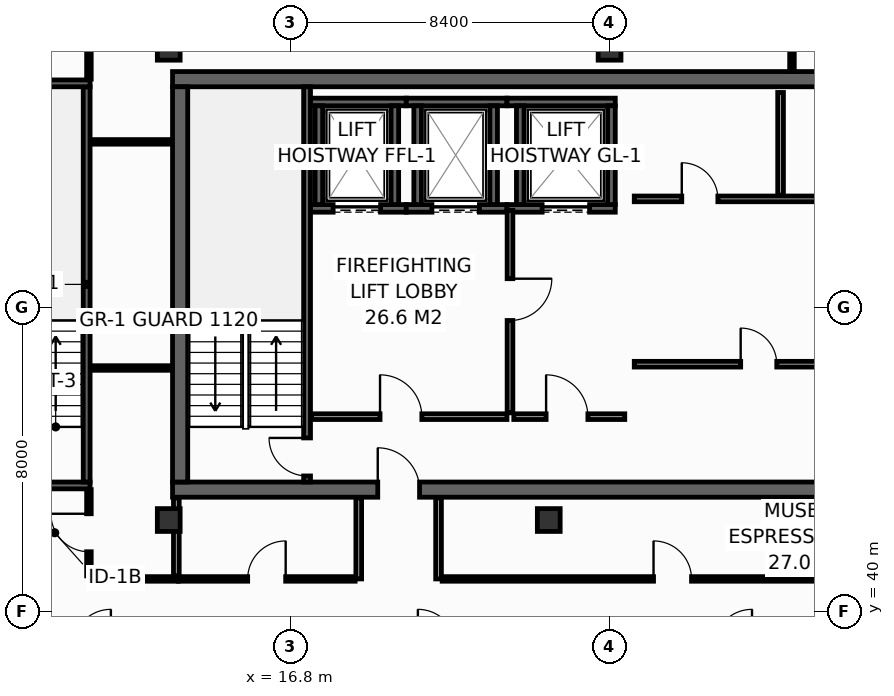
"""IFC4 building model, lengths in metres.
Left out: names, types, materials, properties, quantities, classifications, styles, units other than length and angle.
Written with IfcOpenShell. Run it as: python <this file> out.ifc"""

import sys

from ifc_helpers import new_model, si_unit, direction, frame, frame_2d, origin, origin_2d, place, context, subcontext, project, spatial, rectangle, hollow_rectangle, extrude, element, fill, save


model = new_model("IFC4")
c1 = context("Model", 3, precision=1e-05, world=origin(), true_north=direction((0.0, 1.0)))
c2 = subcontext(c1, "Body", "Model", "MODEL_VIEW")
j1 = project(units=[si_unit("LENGTHUNIT", "METRE"), si_unit("PLANEANGLEUNIT", "RADIAN")], contexts=[c1])
p1 = place(None, origin())
s1 = spatial("IfcSite", under=j1, at=p1, CompositionType="ELEMENT")
p2 = place(p1, origin())
s2 = spatial("IfcBuilding", under=s1, at=p2, CompositionType="ELEMENT")
p3 = place(p2, frame((0.0, 0.0, 261.0)))
s3 = spatial("IfcBuildingStorey", under=s2, at=p3, CompositionType="ELEMENT", Elevation=261.0)
p4 = place(p3, frame((13.7, 43.2, 0.0), z_axis=(0.0, 0.0, 1.0), x_axis=(1.0, 0.0, 0.0)))
e1 = element("IfcWall", 1, at=p4, inside=s3, PredefinedType="SHEAR", context=c2, shape_type="SweptSolid", body=[
    extrude(rectangle(XDim=32.5, YDim=0.4, at=frame_2d((16.25, 0.0))), origin(), (0.0, 0.0, 1.0), 3.55),
])
p5 = place(p4, frame((5.4, 0.0, 0.0)))
e2 = element("IfcOpeningElement", 2, at=p5, cuts=e1, PredefinedType="OPENING", context=c2, shape_type="SweptSolid", body=[
    extrude(rectangle(XDim=1.1, YDim=2.15, at=frame_2d((0.55, 1.075))), frame((0.0, 0.21, 0.0), z_axis=(0.0, -1.0, 0.0), x_axis=(1.0, 0.0, 0.0)), (0.0, 0.0, 1.0), 0.42),
])
p6 = place(p4, frame((25.6, 0.0, 0.0)))
e3 = element("IfcOpeningElement", 3, at=p6, cuts=e1, PredefinedType="OPENING", context=c2, shape_type="SweptSolid", body=[
    extrude(rectangle(XDim=1.1, YDim=2.15, at=frame_2d((0.55, 1.075))), frame((0.0, 0.21, 0.0), z_axis=(0.0, -1.0, 0.0), x_axis=(1.0, 0.0, 0.0)), (0.0, 0.0, 1.0), 0.42),
])
p7 = place(p3, frame((13.7, 54.0, 0.0), z_axis=(0.0, 0.0, 1.0), x_axis=(1.0, 0.0, 0.0)))
e4 = element("IfcWall", 4, at=p7, inside=s3, PredefinedType="SHEAR", context=c2, shape_type="SweptSolid", body=[
    extrude(rectangle(XDim=32.5, YDim=0.4, at=frame_2d((16.25, 0.0))), origin(), (0.0, 0.0, 1.0), 3.55),
])
p8 = place(p3, frame((13.9, 43.4, 0.0), z_axis=(0.0, 0.0, 1.0), x_axis=(0.0, 1.0, 0.0)))
e5 = element("IfcWall", 5, at=p8, inside=s3, PredefinedType="SHEAR", context=c2, shape_type="SweptSolid", body=[
    extrude(rectangle(XDim=10.4, YDim=0.4, at=frame_2d((5.2, 0.0))), origin(), (0.0, 0.0, 1.0), 3.55),
])
for number, where, z_axis, x_axis in (
    (6, (13.6, 54.8, 0.0), (0.0, 0.0, 1.0), (1.0, 0.0, 0.0)),
    (7, (25.2, 54.8, 0.0), (0.0, 0.0, 1.0), (1.0, 0.0, 0.0)),
    (8, (13.6, 42.4, 0.0), (0.0, 0.0, 1.0), (1.0, 0.0, 0.0)),
    (9, (23.6, 42.4, 0.0), (0.0, 0.0, 1.0), (1.0, 0.0, 0.0)),
):
    element("IfcColumn", number, at=place(p3, frame(where, z_axis=z_axis, x_axis=x_axis)), inside=s3, PredefinedType="COLUMN", context=c2, shape_type="SweptSolid", body=[
        extrude(hollow_rectangle(XDim=0.6, YDim=0.6, WallThickness=0.028, at=origin_2d()), origin(), (0.0, 0.0, 1.0), 3.8),
    ])
p9 = place(p3, frame((17.33, 50.6, 0.0), z_axis=(0.0, 0.0, 1.0), x_axis=(1.0, 0.0, 0.0)))
e10 = element("IfcWall", 10, at=p9, inside=s3, PredefinedType="SHEAR", context=c2, shape_type="SweptSolid", body=[
    extrude(rectangle(XDim=2.52, YDim=0.2, at=frame_2d((1.26, 0.0))), origin(), (0.0, 0.0, 1.0), 3.55),
])
p10 = place(p9, frame((0.595, 0.0, 0.0)))
e11 = element("IfcOpeningElement", 11, at=p10, cuts=e10, PredefinedType="OPENING", context=c2, shape_type="SweptSolid", body=[
    extrude(rectangle(XDim=1.25, YDim=2.3, at=frame_2d((0.625, 1.15))), frame((0.0, 0.11, 0.0), z_axis=(0.0, -1.0, 0.0), x_axis=(1.0, 0.0, 0.0)), (0.0, 0.0, 1.0), 0.22),
])
p11 = place(p3, frame((17.33, 53.4, 0.0), z_axis=(0.0, 0.0, 1.0), x_axis=(1.0, 0.0, 0.0)))
e12 = element("IfcWall", 12, at=p11, inside=s3, PredefinedType="SHEAR", context=c2, shape_type="SweptSolid", body=[
    extrude(rectangle(XDim=2.52, YDim=0.2, at=frame_2d((1.26, 0.0))), origin(), (0.0, 0.0, 1.0), 3.55),
])
for number, where, z_axis, x_axis in (
    (13, (17.55, 50.7, 0.0), (0.0, 0.0, 1.0), (0.0, 1.0, 0.0)),
    (14, (19.55, 50.7, 0.0), (0.0, 0.0, 1.0), (0.0, 1.0, 0.0)),
):
    element("IfcWall", number, at=place(p3, frame(where, z_axis=z_axis, x_axis=x_axis)), inside=s3, PredefinedType="SHEAR", context=c2, shape_type="SweptSolid", body=[
        extrude(rectangle(XDim=2.6, YDim=0.2, at=frame_2d((1.3, 0.0))), origin(), (0.0, 0.0, 1.0), 3.55),
    ])
p12 = place(p3, frame((19.85, 50.6, 0.0), z_axis=(0.0, 0.0, 1.0), x_axis=(1.0, 0.0, 0.0)))
e15 = element("IfcWall", 15, at=p12, inside=s3, PredefinedType="SHEAR", context=c2, shape_type="SweptSolid", body=[
    extrude(rectangle(XDim=2.65, YDim=0.2, at=frame_2d((1.325, 0.0))), origin(), (0.0, 0.0, 1.0), 3.55),
])
p13 = place(p12, frame((0.675, 0.0, 0.0)))
e16 = element("IfcOpeningElement", 16, at=p13, cuts=e15, PredefinedType="OPENING", context=c2, shape_type="SweptSolid", body=[
    extrude(rectangle(XDim=1.25, YDim=2.3, at=frame_2d((0.625, 1.15))), frame((0.0, 0.11, 0.0), z_axis=(0.0, -1.0, 0.0), x_axis=(1.0, 0.0, 0.0)), (0.0, 0.0, 1.0), 0.22),
])
p14 = place(p3, frame((19.85, 53.4, 0.0), z_axis=(0.0, 0.0, 1.0), x_axis=(1.0, 0.0, 0.0)))
e17 = element("IfcWall", 17, at=p14, inside=s3, PredefinedType="SHEAR", context=c2, shape_type="SweptSolid", body=[
    extrude(rectangle(XDim=2.65, YDim=0.2, at=frame_2d((1.325, 0.0))), origin(), (0.0, 0.0, 1.0), 3.55),
])
for number, where, z_axis, x_axis in (
    (18, (20.15, 50.7, 0.0), (0.0, 0.0, 1.0), (0.0, 1.0, 0.0)),
    (19, (22.15, 50.7, 0.0), (0.0, 0.0, 1.0), (0.0, 1.0, 0.0)),
):
    element("IfcWall", number, at=place(p3, frame(where, z_axis=z_axis, x_axis=x_axis)), inside=s3, PredefinedType="SHEAR", context=c2, shape_type="SweptSolid", body=[
        extrude(rectangle(XDim=2.6, YDim=0.2, at=frame_2d((1.3, 0.0))), origin(), (0.0, 0.0, 1.0), 3.55),
    ])
p15 = place(p3, frame((22.5, 50.6, 0.0), z_axis=(0.0, 0.0, 1.0), x_axis=(1.0, 0.0, 0.0)))
e20 = element("IfcWall", 20, at=p15, inside=s3, PredefinedType="SHEAR", context=c2, shape_type="SweptSolid", body=[
    extrude(rectangle(XDim=2.85, YDim=0.2, at=frame_2d((1.425, 0.0))), origin(), (0.0, 0.0, 1.0), 3.55),
])
p16 = place(p15, frame((0.925, 0.0, 0.0)))
e21 = element("IfcOpeningElement", 21, at=p16, cuts=e20, PredefinedType="OPENING", context=c2, shape_type="SweptSolid", body=[
    extrude(rectangle(XDim=1.25, YDim=2.3, at=frame_2d((0.625, 1.15))), frame((0.0, 0.11, 0.0), z_axis=(0.0, -1.0, 0.0), x_axis=(1.0, 0.0, 0.0)), (0.0, 0.0, 1.0), 0.22),
])
p17 = place(p3, frame((22.5, 53.4, 0.0), z_axis=(0.0, 0.0, 1.0), x_axis=(1.0, 0.0, 0.0)))
e22 = element("IfcWall", 22, at=p17, inside=s3, PredefinedType="SHEAR", context=c2, shape_type="SweptSolid", body=[
    extrude(rectangle(XDim=2.85, YDim=0.2, at=frame_2d((1.425, 0.0))), origin(), (0.0, 0.0, 1.0), 3.55),
])
for number, where, z_axis, x_axis in (
    (23, (22.85, 50.7, 0.0), (0.0, 0.0, 1.0), (0.0, 1.0, 0.0)),
    (24, (25.25, 50.7, 0.0), (0.0, 0.0, 1.0), (0.0, 1.0, 0.0)),
):
    element("IfcWall", number, at=place(p3, frame(where, z_axis=z_axis, x_axis=x_axis)), inside=s3, PredefinedType="SHEAR", context=c2, shape_type="SweptSolid", body=[
        extrude(rectangle(XDim=2.6, YDim=0.2, at=frame_2d((1.3, 0.0))), origin(), (0.0, 0.0, 1.0), 3.55),
    ])
p18 = place(p3, frame((17.24, 43.4, 0.0), z_axis=(0.0, 0.0, 1.0), x_axis=(0.0, 1.0, 0.0)))
e25 = element("IfcWall", 25, at=p18, inside=s3, PredefinedType="SHEAR", context=c2, shape_type="SweptSolid", body=[
    extrude(rectangle(XDim=10.4, YDim=0.18, at=frame_2d((5.2, 0.0))), origin(), (0.0, 0.0, 1.0), 3.55),
])
p19 = place(p18, frame((0.16, 0.0, 0.0)))
e26 = element("IfcOpeningElement", 26, at=p19, cuts=e25, PredefinedType="OPENING", context=c2, shape_type="SweptSolid", body=[
    extrude(rectangle(XDim=1.0, YDim=2.15, at=frame_2d((0.5, 1.075))), frame((0.0, 0.1, 0.0), z_axis=(0.0, -1.0, 0.0), x_axis=(1.0, 0.0, 0.0)), (0.0, 0.0, 1.0), 0.2),
])
p20 = place(p3, frame((8.12, 43.31, 0.0), z_axis=(0.0, 0.0, 1.0), x_axis=(1.0, 0.0, 0.0)))
e27 = element("IfcWall", 27, at=p20, inside=s3, PredefinedType="SHEAR", context=c2, shape_type="SweptSolid", body=[
    extrude(rectangle(XDim=3.41, YDim=0.18, at=frame_2d((1.705, 0.0))), origin(), (0.0, 0.0, 1.0), 3.55),
])
p21 = place(p20, frame((1.15, 0.0, 0.0)))
e28 = element("IfcOpeningElement", 28, at=p21, cuts=e27, PredefinedType="OPENING", context=c2, shape_type="SweptSolid", body=[
    extrude(rectangle(XDim=1.1, YDim=2.15, at=frame_2d((0.55, 1.075))), frame((0.0, 0.1, 0.0), z_axis=(0.0, -1.0, 0.0), x_axis=(1.0, 0.0, 0.0)), (0.0, 0.0, 1.0), 0.2),
])
p22 = place(p3, frame((11.44, 43.4, 0.0), z_axis=(0.0, 0.0, 1.0), x_axis=(0.0, 1.0, 0.0)))
e29 = element("IfcWall", 29, at=p22, inside=s3, PredefinedType="SHEAR", context=c2, shape_type="SweptSolid", body=[
    extrude(rectangle(XDim=10.4, YDim=0.18, at=frame_2d((5.2, 0.0))), origin(), (0.0, 0.0, 1.0), 3.55),
])
p23 = place(p3, frame((11.53, 53.89, 0.0), z_axis=(0.0, 0.0, 1.0), x_axis=(-1.0, 0.0, 0.0)))
e30 = element("IfcWall", 30, at=p23, inside=s3, PredefinedType="SHEAR", context=c2, shape_type="SweptSolid", body=[
    extrude(rectangle(XDim=3.41, YDim=0.18, at=frame_2d((1.705, 0.0))), origin(), (0.0, 0.0, 1.0), 3.55),
])
p24 = place(p3, frame((17.36, 45.12, 0.0), z_axis=(0.0, 0.0, 1.0), x_axis=(1.0, 0.0, 0.0)))
e31 = element("IfcWall", 31, at=p24, inside=s3, PredefinedType="PARTITIONING", context=c2, shape_type="SweptSolid", body=[
    extrude(rectangle(XDim=5.14, YDim=0.15, at=frame_2d((2.57, 0.0))), origin(), (0.0, 0.0, 1.0), 3.55),
])
p25 = place(p24, frame((1.8, 0.0, 0.0)))
e32 = element("IfcOpeningElement", 32, at=p25, cuts=e31, PredefinedType="OPENING", context=c2, shape_type="SweptSolid", body=[
    extrude(rectangle(XDim=1.1, YDim=2.15, at=frame_2d((0.55, 1.075))), frame((0.0, 0.085, 0.0), z_axis=(0.0, -1.0, 0.0), x_axis=(1.0, 0.0, 0.0)), (0.0, 0.0, 1.0), 0.17),
])
p26 = place(p3, frame((22.58, 50.55, 0.0), z_axis=(0.0, 0.0, 1.0), x_axis=(0.0, -1.0, 0.0)))
e33 = element("IfcWall", 33, at=p26, inside=s3, PredefinedType="PARTITIONING", context=c2, shape_type="SweptSolid", body=[
    extrude(rectangle(XDim=5.33, YDim=0.15, at=frame_2d((2.665, 0.0))), origin(), (0.0, 0.0, 1.0), 3.55),
])
p27 = place(p26, frame((1.8, 0.0, 0.0)))
e34 = element("IfcOpeningElement", 34, at=p27, cuts=e33, PredefinedType="OPENING", context=c2, shape_type="SweptSolid", body=[
    extrude(rectangle(XDim=1.1, YDim=2.15, at=frame_2d((0.55, 1.075))), frame((0.0, 0.085, 0.0), z_axis=(0.0, -1.0, 0.0), x_axis=(1.0, 0.0, 0.0)), (0.0, 0.0, 1.0), 0.17),
])
p28 = place(p3, frame((22.68, 45.12, 0.0), z_axis=(0.0, 0.0, 1.0), x_axis=(1.0, 0.0, 0.0)))
e35 = element("IfcWall", 35, at=p28, inside=s3, PredefinedType="PARTITIONING", context=c2, shape_type="SweptSolid", body=[
    extrude(rectangle(XDim=2.92, YDim=0.15, at=frame_2d((1.46, 0.0))), origin(), (0.0, 0.0, 1.0), 3.55),
])
p29 = place(p28, frame((0.85, 0.0, 0.0)))
e36 = element("IfcOpeningElement", 36, at=p29, cuts=e35, PredefinedType="OPENING", context=c2, shape_type="SweptSolid", body=[
    extrude(rectangle(XDim=1.1, YDim=2.15, at=frame_2d((0.55, 1.075))), frame((0.0, 0.085, 0.0), z_axis=(0.0, -1.0, 0.0), x_axis=(1.0, 0.0, 0.0)), (0.0, 0.0, 1.0), 0.17),
])
p30 = place(p3, frame((25.85, 50.85, 0.0), z_axis=(0.0, 0.0, 1.0), x_axis=(1.0, 0.0, 0.0)))
e37 = element("IfcWall", 37, at=p30, inside=s3, PredefinedType="PARTITIONING", context=c2, shape_type="SweptSolid", body=[
    extrude(rectangle(XDim=7.65, YDim=0.15, at=frame_2d((3.825, 0.0))), origin(), (0.0, 0.0, 1.0), 3.55),
])
p31 = place(p30, frame((1.25, 0.0, 0.0)))
e38 = element("IfcOpeningElement", 38, at=p31, cuts=e37, PredefinedType="OPENING", context=c2, shape_type="SweptSolid", body=[
    extrude(rectangle(XDim=0.95, YDim=2.15, at=frame_2d((0.475, 1.075))), frame((0.0, 0.085, 0.0), z_axis=(0.0, -1.0, 0.0), x_axis=(1.0, 0.0, 0.0)), (0.0, 0.0, 1.0), 0.17),
])
p32 = place(p30, frame((5.05, 0.0, 0.0)))
e39 = element("IfcOpeningElement", 39, at=p32, cuts=e37, PredefinedType="OPENING", context=c2, shape_type="SweptSolid", body=[
    extrude(rectangle(XDim=0.95, YDim=2.15, at=frame_2d((0.475, 1.075))), frame((0.0, 0.085, 0.0), z_axis=(0.0, -1.0, 0.0), x_axis=(1.0, 0.0, 0.0)), (0.0, 0.0, 1.0), 0.17),
])
p33 = place(p3, frame((29.7, 50.95, 0.0), z_axis=(0.0, 0.0, 1.0), x_axis=(0.0, 1.0, 0.0)))
e40 = element("IfcWall", 40, at=p33, inside=s3, PredefinedType="PARTITIONING", context=c2, shape_type="SweptSolid", body=[
    extrude(rectangle(XDim=2.7, YDim=0.15, at=frame_2d((1.35, 0.0))), origin(), (0.0, 0.0, 1.0), 3.55),
])
p34 = place(p3, frame((25.85, 46.5, 0.0), z_axis=(0.0, 0.0, 1.0), x_axis=(1.0, 0.0, 0.0)))
e41 = element("IfcWall", 41, at=p34, inside=s3, PredefinedType="PARTITIONING", context=c2, shape_type="SweptSolid", body=[
    extrude(rectangle(XDim=7.65, YDim=0.15, at=frame_2d((3.825, 0.0))), origin(), (0.0, 0.0, 1.0), 3.55),
])
p35 = place(p34, frame((2.8, 0.0, 0.0)))
e42 = element("IfcOpeningElement", 42, at=p35, cuts=e41, PredefinedType="OPENING", context=c2, shape_type="SweptSolid", body=[
    extrude(rectangle(XDim=0.95, YDim=2.15, at=frame_2d((0.475, 1.075))), frame((0.0, 0.085, 0.0), z_axis=(0.0, -1.0, 0.0), x_axis=(1.0, 0.0, 0.0)), (0.0, 0.0, 1.0), 0.17),
])
p36 = place(p3, frame((11.5, 40.85, 0.0), z_axis=(0.0, 0.0, 1.0), x_axis=(1.0, 0.0, 0.0)))
e43 = element("IfcWall", 43, at=p36, inside=s3, PredefinedType="PARTITIONING", context=c2, shape_type="SweptSolid", body=[
    extrude(rectangle(XDim=2.35, YDim=0.12, at=frame_2d((1.175, 0.0))), origin(), (0.0, 0.0, 1.0), 3.55),
])
p37 = place(p3, frame((11.55, 52.35, 0.0), z_axis=(0.0, 0.0, 1.0), x_axis=(1.0, 0.0, 0.0)))
e44 = element("IfcWall", 44, at=p37, inside=s3, PredefinedType="PARTITIONING", context=c2, shape_type="SweptSolid", body=[
    extrude(rectangle(XDim=2.13, YDim=0.12, at=frame_2d((1.065, 0.0))), origin(), (0.0, 0.0, 1.0), 3.55),
])
p38 = place(p3, frame((30.0, 54.22, 0.0), z_axis=(0.0, 0.0, 1.0), x_axis=(0.0, 1.0, 0.0)))
e45 = element("IfcWall", 45, at=p38, inside=s3, PredefinedType="PARTITIONING", context=c2, shape_type="SweptSolid", body=[
    extrude(rectangle(XDim=1.775, YDim=0.12, at=frame_2d((0.888, 0.0))), origin(), (0.0, 0.0, 1.0), 2.935),
])
p39 = place(p3, frame((11.5, 54.0, 0.0), z_axis=(0.0, 0.0, 1.0), x_axis=(0.0, 1.0, 0.0)))
e46 = element("IfcWall", 46, at=p39, inside=s3, PredefinedType="PARTITIONING", context=c2, shape_type="SweptSolid", body=[
    extrude(rectangle(XDim=1.995, YDim=0.12, at=frame_2d((0.998, 0.0))), origin(), (0.0, 0.0, 1.0), 2.935),
])
p40 = place(p3, frame((11.55, 46.4, 0.0), z_axis=(0.0, 0.0, 1.0), x_axis=(1.0, 0.0, 0.0)))
e47 = element("IfcWall", 47, at=p40, inside=s3, PredefinedType="PARTITIONING", context=c2, shape_type="SweptSolid", body=[
    extrude(rectangle(XDim=2.13, YDim=0.12, at=frame_2d((1.065, 0.0))), origin(), (0.0, 0.0, 1.0), 3.55),
])
p41 = place(p3, frame((11.5, 40.93, 0.0), z_axis=(0.0, 0.0, 1.0), x_axis=(0.0, 1.0, 0.0)))
e48 = element("IfcWall", 48, at=p41, inside=s3, PredefinedType="PARTITIONING", context=c2, shape_type="SweptSolid", body=[
    extrude(rectangle(XDim=2.27, YDim=0.12, at=frame_2d((1.135, 0.0))), origin(), (0.0, 0.0, 1.0), 2.947),
])
p42 = place(p41, frame((0.635, 0.0, 0.0)))
e49 = element("IfcOpeningElement", 49, at=p42, cuts=e48, PredefinedType="OPENING", context=c2, shape_type="SweptSolid", body=[
    extrude(rectangle(XDim=1.0, YDim=2.15, at=frame_2d((0.5, 1.075))), frame((0.0, 0.07, 0.0), z_axis=(0.0, -1.0, 0.0), x_axis=(1.0, 0.0, 0.0)), (0.0, 0.0, 1.0), 0.14),
])
p43 = place(p3, frame((13.8, 40.93, 0.0), z_axis=(0.0, 0.0, 1.0), x_axis=(0.0, 1.0, 0.0)))
e50 = element("IfcWall", 50, at=p43, inside=s3, PredefinedType="PARTITIONING", context=c2, shape_type="SweptSolid", body=[
    extrude(rectangle(XDim=2.05, YDim=0.15, at=frame_2d((1.025, 0.0))), origin(), (0.0, 0.0, 1.0), 3.55),
])
for number, where, z_axis, x_axis in (
    (51, (18.6, 40.85, 0.0), (0.0, 0.0, 1.0), (0.0, 1.0, 0.0)),
    (52, (20.7, 40.85, 0.0), (0.0, 0.0, 1.0), (0.0, 1.0, 0.0)),
):
    element("IfcWall", number, at=place(p3, frame(where, z_axis=z_axis, x_axis=x_axis)), inside=s3, PredefinedType="PARTITIONING", context=c2, shape_type="SweptSolid", body=[
        extrude(rectangle(XDim=2.13, YDim=0.15, at=frame_2d((1.065, 0.0))), origin(), (0.0, 0.0, 1.0), 3.55),
    ])
p44 = place(p3, frame((13.85, 40.85, 0.0), z_axis=(0.0, 0.0, 1.0), x_axis=(1.0, 0.0, 0.0)))
e53 = element("IfcWall", 53, at=p44, inside=s3, PredefinedType="PARTITIONING", context=c2, shape_type="SweptSolid", body=[
    extrude(rectangle(XDim=4.655, YDim=0.12, at=frame_2d((2.327, 0.0))), origin(), (0.0, 0.0, 1.0), 3.55),
])
p45 = place(p44, frame((1.827, 0.0, 0.0)))
e54 = element("IfcOpeningElement", 54, at=p45, cuts=e53, PredefinedType="OPENING", context=c2, shape_type="SweptSolid", body=[
    extrude(rectangle(XDim=1.0, YDim=2.15, at=frame_2d((0.5, 1.075))), frame((0.0, 0.07, 0.0), z_axis=(0.0, -1.0, 0.0), x_axis=(1.0, 0.0, 0.0)), (0.0, 0.0, 1.0), 0.14),
])
p46 = place(p3, frame((20.795, 40.85, 0.0), z_axis=(0.0, 0.0, 1.0), x_axis=(1.0, 0.0, 0.0)))
e55 = element("IfcWall", 55, at=p46, inside=s3, PredefinedType="PARTITIONING", context=c2, shape_type="SweptSolid", body=[
    extrude(rectangle(XDim=12.125, YDim=0.12, at=frame_2d((6.062, 0.0))), origin(), (0.0, 0.0, 1.0), 2.947),
])
p47 = place(p46, frame((5.562, 0.0, 0.0)))
e56 = element("IfcOpeningElement", 56, at=p47, cuts=e55, PredefinedType="OPENING", context=c2, shape_type="SweptSolid", body=[
    extrude(rectangle(XDim=1.0, YDim=2.15, at=frame_2d((0.5, 1.075))), frame((0.0, 0.07, 0.0), z_axis=(0.0, -1.0, 0.0), x_axis=(1.0, 0.0, 0.0)), (0.0, 0.0, 1.0), 0.14),
])
p48 = place(p10, origin())
e57 = element("IfcDoor", 57, at=p48, inside=s3, OperationType="SLIDING_TO_LEFT", PredefinedType="DOOR", context=c2, shape_type="SweptSolid", body=[
    extrude(rectangle(XDim=1.25, YDim=2.3, at=frame_2d((0.625, 1.15))), frame((0.0, 0.025, 0.0), z_axis=(0.0, -1.0, 0.0), x_axis=(1.0, 0.0, 0.0)), (0.0, 0.0, 1.0), 0.05),
])
fill(e11, e57)
p49 = place(p13, origin())
e58 = element("IfcDoor", 58, at=p49, inside=s3, OperationType="SLIDING_TO_LEFT", PredefinedType="DOOR", context=c2, shape_type="SweptSolid", body=[
    extrude(rectangle(XDim=1.25, YDim=2.3, at=frame_2d((0.625, 1.15))), frame((0.0, 0.025, 0.0), z_axis=(0.0, -1.0, 0.0), x_axis=(1.0, 0.0, 0.0)), (0.0, 0.0, 1.0), 0.05),
])
fill(e16, e58)
p50 = place(p16, origin())
e59 = element("IfcDoor", 59, at=p50, inside=s3, OperationType="SLIDING_TO_LEFT", PredefinedType="DOOR", context=c2, shape_type="SweptSolid", body=[
    extrude(rectangle(XDim=1.25, YDim=2.3, at=frame_2d((0.625, 1.15))), frame((0.0, 0.025, 0.0), z_axis=(0.0, -1.0, 0.0), x_axis=(1.0, 0.0, 0.0)), (0.0, 0.0, 1.0), 0.05),
])
fill(e21, e59)
p51 = place(p19, origin())
e60 = element("IfcDoor", 60, at=p51, inside=s3, OperationType="SINGLE_SWING_RIGHT", PredefinedType="DOOR", context=c2, shape_type="SweptSolid", body=[
    extrude(rectangle(XDim=1.0, YDim=2.15, at=frame_2d((0.5, 1.075))), frame((0.0, 0.025, 0.0), z_axis=(0.0, -1.0, 0.0), x_axis=(1.0, 0.0, 0.0)), (0.0, 0.0, 1.0), 0.05),
])
fill(e26, e60)
p52 = place(p25, origin())
e61 = element("IfcDoor", 61, at=p52, inside=s3, OperationType="SINGLE_SWING_LEFT", PredefinedType="DOOR", context=c2, shape_type="SweptSolid", body=[
    extrude(rectangle(XDim=1.1, YDim=2.15, at=frame_2d((0.55, 1.075))), frame((0.0, 0.025, 0.0), z_axis=(0.0, -1.0, 0.0), x_axis=(1.0, 0.0, 0.0)), (0.0, 0.0, 1.0), 0.05),
])
fill(e32, e61)
p53 = place(p27, origin())
e62 = element("IfcDoor", 62, at=p53, inside=s3, OperationType="SINGLE_SWING_LEFT", PredefinedType="DOOR", context=c2, shape_type="SweptSolid", body=[
    extrude(rectangle(XDim=1.1, YDim=2.15, at=frame_2d((0.55, 1.075))), frame((0.0, 0.025, 0.0), z_axis=(0.0, -1.0, 0.0), x_axis=(1.0, 0.0, 0.0)), (0.0, 0.0, 1.0), 0.05),
])
fill(e34, e62)
p54 = place(p29, origin())
e63 = element("IfcDoor", 63, at=p54, inside=s3, OperationType="SINGLE_SWING_LEFT", PredefinedType="DOOR", context=c2, shape_type="SweptSolid", body=[
    extrude(rectangle(XDim=1.1, YDim=2.15, at=frame_2d((0.55, 1.075))), frame((0.0, 0.025, 0.0), z_axis=(0.0, -1.0, 0.0), x_axis=(1.0, 0.0, 0.0)), (0.0, 0.0, 1.0), 0.05),
])
fill(e36, e63)
p55 = place(p5, origin())
e64 = element("IfcDoor", 64, at=p55, inside=s3, OperationType="SINGLE_SWING_LEFT", PredefinedType="DOOR", context=c2, shape_type="SweptSolid", body=[
    extrude(rectangle(XDim=1.1, YDim=2.15, at=frame_2d((0.55, 1.075))), frame((0.0, 0.025, 0.0), z_axis=(0.0, -1.0, 0.0), x_axis=(1.0, 0.0, 0.0)), (0.0, 0.0, 1.0), 0.05),
])
fill(e2, e64)
p56 = place(p31, origin())
e65 = element("IfcDoor", 65, at=p56, inside=s3, OperationType="SINGLE_SWING_LEFT", PredefinedType="DOOR", context=c2, shape_type="SweptSolid", body=[
    extrude(rectangle(XDim=0.95, YDim=2.15, at=frame_2d((0.475, 1.075))), frame((0.0, 0.025, 0.0), z_axis=(0.0, -1.0, 0.0), x_axis=(1.0, 0.0, 0.0)), (0.0, 0.0, 1.0), 0.05),
])
fill(e38, e65)
p57 = place(p35, origin())
e66 = element("IfcDoor", 66, at=p57, inside=s3, OperationType="SINGLE_SWING_LEFT", PredefinedType="DOOR", context=c2, shape_type="SweptSolid", body=[
    extrude(rectangle(XDim=0.95, YDim=2.15, at=frame_2d((0.475, 1.075))), frame((0.0, 0.025, 0.0), z_axis=(0.0, -1.0, 0.0), x_axis=(1.0, 0.0, 0.0)), (0.0, 0.0, 1.0), 0.05),
])
fill(e42, e66)
p58 = place(p42, origin())
e67 = element("IfcDoor", 67, at=p58, inside=s3, OperationType="SINGLE_SWING_RIGHT", PredefinedType="DOOR", context=c2, shape_type="SweptSolid", body=[
    extrude(rectangle(XDim=1.0, YDim=2.15, at=frame_2d((0.5, 1.075))), frame((0.0, 0.025, 0.0), z_axis=(0.0, -1.0, 0.0), x_axis=(1.0, 0.0, 0.0)), (0.0, 0.0, 1.0), 0.05),
])
fill(e49, e67)
p59 = place(p45, origin())
e68 = element("IfcDoor", 68, at=p59, inside=s3, OperationType="SINGLE_SWING_RIGHT", PredefinedType="DOOR", context=c2, shape_type="SweptSolid", body=[
    extrude(rectangle(XDim=1.0, YDim=2.15, at=frame_2d((0.5, 1.075))), frame((0.0, 0.025, 0.0), z_axis=(0.0, -1.0, 0.0), x_axis=(1.0, 0.0, 0.0)), (0.0, 0.0, 1.0), 0.05),
])
fill(e54, e68)
p60 = place(p47, origin())
e69 = element("IfcDoor", 69, at=p60, inside=s3, OperationType="SINGLE_SWING_LEFT", PredefinedType="DOOR", context=c2, shape_type="SweptSolid", body=[
    extrude(rectangle(XDim=1.0, YDim=2.15, at=frame_2d((0.5, 1.075))), frame((0.0, 0.025, 0.0), z_axis=(0.0, -1.0, 0.0), x_axis=(1.0, 0.0, 0.0)), (0.0, 0.0, 1.0), 0.05),
])
fill(e56, e69)
save(model, sys.argv[1])
